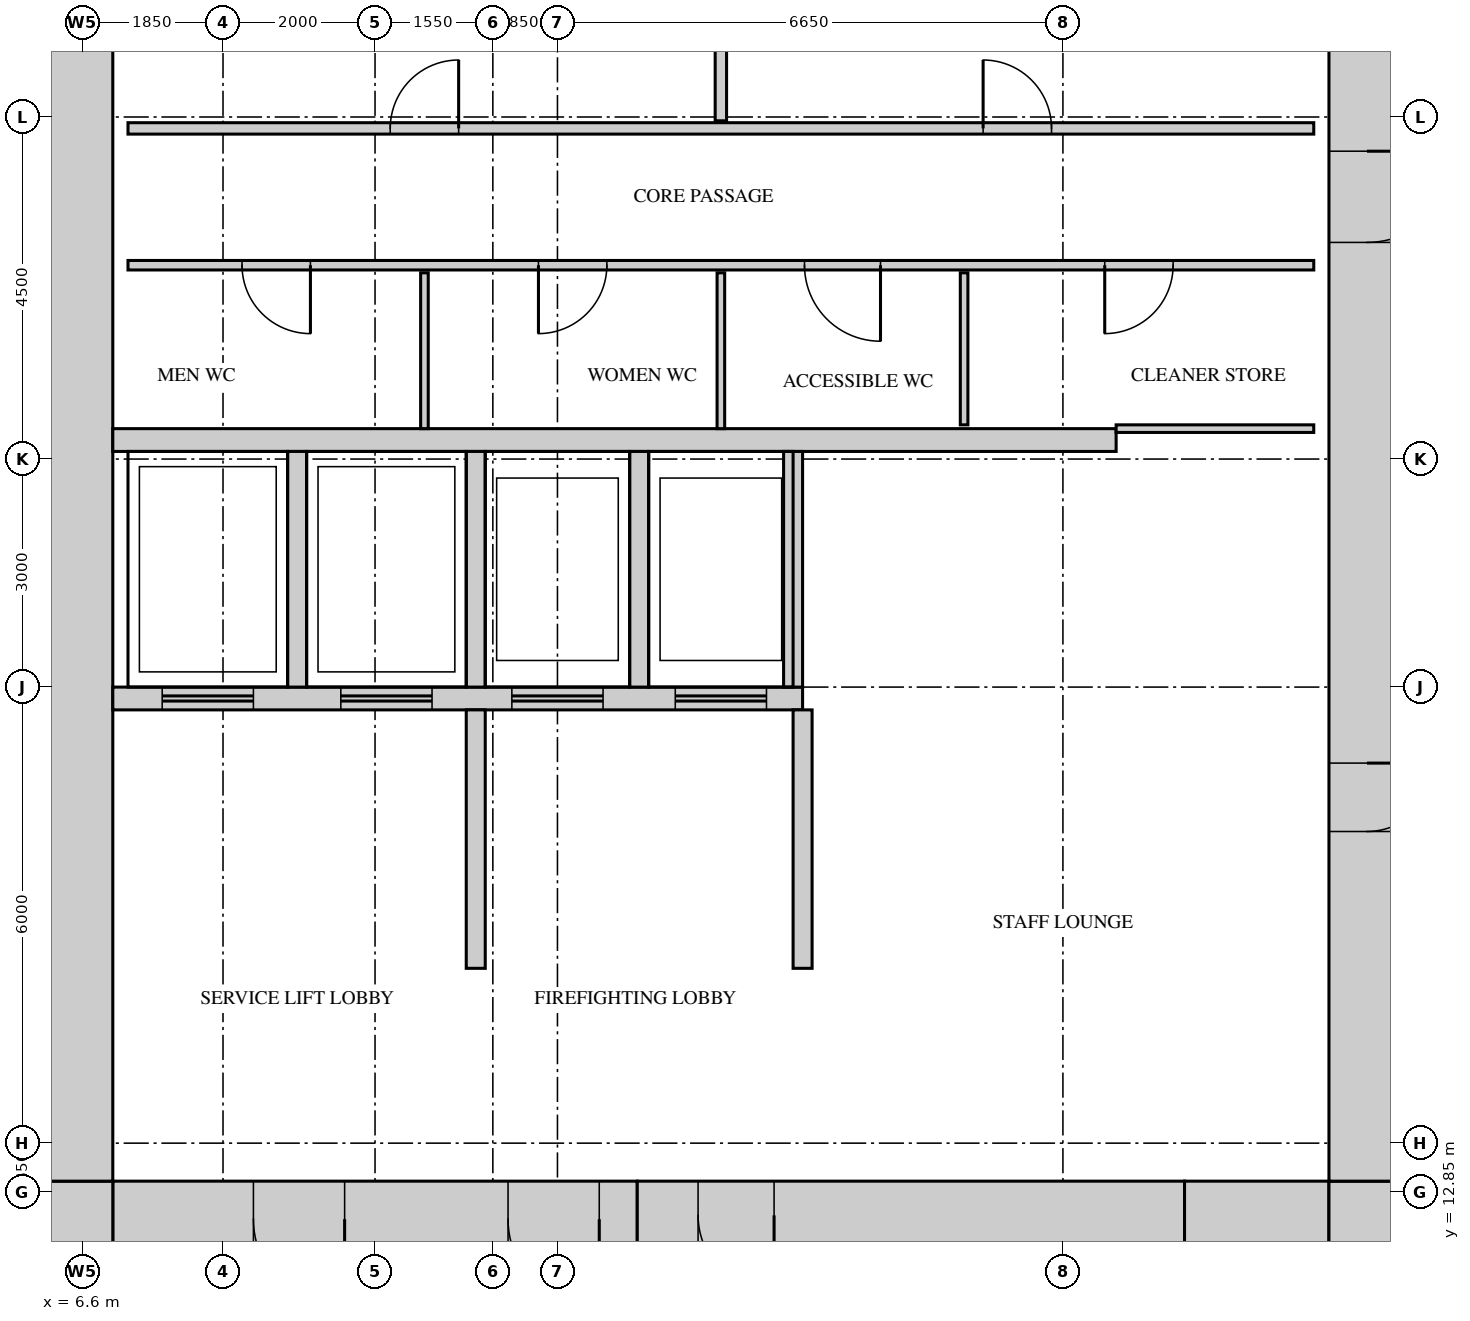
"""IFC4 building model, lengths in metres.
Left out: names, types, materials, properties, quantities, classifications, styles, units other than length and angle.
Written with IfcOpenShell. Run it as: python <this file> out.ifc"""

import sys

from ifc_helpers import new_model, si_unit, direction, frame, frame_2d, origin, place, context, subcontext, project, spatial, rectangle, extrude, source, transform, mapped, element, fill, save


model = new_model("IFC4")
c1 = context("Model", 3, precision=1e-05, world=origin(), true_north=direction((0.0, 1.0)))
c2 = subcontext(c1, "Body", "Model", "MODEL_VIEW")
j1 = project(units=[si_unit("LENGTHUNIT", "METRE"), si_unit("PLANEANGLEUNIT", "RADIAN")], contexts=[c1])
p1 = place(None, origin())
s1 = spatial("IfcSite", under=j1, at=p1, CompositionType="ELEMENT")
p2 = place(p1, origin())
s2 = spatial("IfcBuilding", under=s1, at=p2, CompositionType="ELEMENT")
p3 = place(p2, frame((0.0, 0.0, 145.5)))
s3 = spatial("IfcBuildingStorey", under=s2, at=p3, CompositionType="ELEMENT", Elevation=145.5)
m1 = source(origin(), c2, "Body", "SweptSolid", [
    extrude(rectangle(XDim=6.9, YDim=1.0, at=frame_2d((3.45, 0.0))), origin(), (0.0, 0.0, 1.0), 4.1),
])
p4 = place(p3, frame((7.0, 12.5, 0.0), z_axis=(0.0, 0.0, 1.0), x_axis=(1.0, 0.0, 0.0)))
e1 = element("IfcWall", 1, at=p4, inside=s3, PredefinedType="SHEAR", context=c2, shape_type="MappedRepresentation", body=[
    mapped(m1, transform((0.0, 0.0, 0.0))),
])
m2 = source(origin(), c2, "Body", "SweptSolid", [
    extrude(rectangle(XDim=1.2, YDim=2.1, at=frame_2d((0.6, 1.05))), frame((0.0, 0.51, 0.0), z_axis=(0.0, -1.0, 0.0), x_axis=(1.0, 0.0, 0.0)), (0.0, 0.0, 1.0), 1.02),
])
p5 = place(p4, frame((5.2, 0.0, 0.0)))
e2 = element("IfcOpeningElement", 2, at=p5, cuts=e1, PredefinedType="OPENING", context=c2, shape_type="MappedRepresentation", body=[
    mapped(m2, transform((0.0, 0.0, 0.0))),
])
p6 = place(p4, frame((1.85, 0.0, 0.0)))
e3 = element("IfcOpeningElement", 3, at=p6, cuts=e1, PredefinedType="OPENING", context=c2, shape_type="MappedRepresentation", body=[
    mapped(m2, transform((0.0, 0.0, 0.0))),
])
m3 = source(origin(), c2, "Body", "SweptSolid", [
    extrude(rectangle(XDim=7.2, YDim=0.9, at=frame_2d((3.6, 0.0))), origin(), (0.0, 0.0, 1.0), 4.1),
])
p7 = place(p3, frame((13.9, 12.55, 0.0), z_axis=(0.0, 0.0, 1.0), x_axis=(1.0, 0.0, 0.0)))
e4 = element("IfcWall", 4, at=p7, inside=s3, PredefinedType="SHEAR", context=c2, shape_type="MappedRepresentation", body=[
    mapped(m3, transform((0.0, 0.0, 0.0))),
])
m4 = source(origin(), c2, "Body", "SweptSolid", [
    extrude(rectangle(XDim=1.0, YDim=2.1, at=frame_2d((0.5, 1.05))), frame((0.0, 0.46, 0.0), z_axis=(0.0, -1.0, 0.0), x_axis=(1.0, 0.0, 0.0)), (0.0, 0.0, 1.0), 0.92),
])
p8 = place(p7, frame((0.8, 0.0, 0.0)))
e5 = element("IfcOpeningElement", 5, at=p8, cuts=e4, PredefinedType="OPENING", context=c2, shape_type="MappedRepresentation", body=[
    mapped(m4, transform((0.0, 0.0, 0.0))),
])
m5 = source(origin(), c2, "Body", "SweptSolid", [
    extrude(rectangle(XDim=1.9, YDim=1.0, at=frame_2d((0.95, 0.0))), origin(), (0.0, 0.0, 1.0), 4.1),
])
p9 = place(p3, frame((21.1, 12.5, 0.0), z_axis=(0.0, 0.0, 1.0), x_axis=(1.0, 0.0, 0.0)))
e6 = element("IfcWall", 6, at=p9, inside=s3, PredefinedType="SHEAR", context=c2, shape_type="MappedRepresentation", body=[
    mapped(m5, transform((0.0, 0.0, 0.0))),
])
m6 = source(origin(), c2, "Body", "SweptSolid", [
    extrude(rectangle(XDim=1.0, YDim=1.0, at=frame_2d((0.5, 0.0))), origin(), (0.0, 0.0, 1.0), 4.1),
])
for number, where, z_axis, x_axis in (
    (7, (23.0, 12.5, 0.0), (0.0, 0.0, 1.0), (1.0, 0.0, 0.0)),
    (8, (6.0, 12.5, 0.0), (0.0, 0.0, 1.0), (1.0, 0.0, 0.0)),
):
    element("IfcWall", number, at=place(p3, frame(where, z_axis=z_axis, x_axis=x_axis)), inside=s3, PredefinedType="SHEAR", context=c2, shape_type="MappedRepresentation", body=[
        mapped(m6, transform((0.0, 0.0, 0.0))),
    ])
m7 = source(origin(), c2, "Body", "SweptSolid", [
    extrude(rectangle(XDim=28.0, YDim=1.0, at=frame_2d((14.0, 0.0))), origin(), (0.0, 0.0, 1.0), 4.1),
])
p10 = place(p3, frame((23.5, 13.0, 0.0), z_axis=(0.0, 0.0, 1.0), x_axis=(0.0, 1.0, 0.0)))
e9 = element("IfcWall", 9, at=p10, inside=s3, PredefinedType="SHEAR", context=c2, shape_type="MappedRepresentation", body=[
    mapped(m7, transform((0.0, 0.0, 0.0))),
])
m8 = source(origin(), c2, "Body", "SweptSolid", [
    extrude(rectangle(XDim=1.8, YDim=2.1, at=frame_2d((0.9, 1.05))), frame((0.0, 0.51, 0.0), z_axis=(0.0, -1.0, 0.0), x_axis=(1.0, 0.0, 0.0)), (0.0, 0.0, 1.0), 1.02),
])
p11 = place(p10, frame((22.6, 0.0, 0.0)))
e10 = element("IfcOpeningElement", 10, at=p11, cuts=e9, PredefinedType="OPENING", context=c2, shape_type="MappedRepresentation", body=[
    mapped(m8, transform((0.0, 0.0, 0.0))),
])
p12 = place(p10, frame((12.35, 0.0, 0.0)))
e11 = element("IfcOpeningElement", 11, at=p12, cuts=e9, PredefinedType="OPENING", context=c2, shape_type="MappedRepresentation", body=[
    mapped(m2, transform((0.0, 0.0, 0.0))),
])
m9 = source(origin(), c2, "Body", "SweptSolid", [
    extrude(rectangle(XDim=0.9, YDim=2.1, at=frame_2d((0.45, 1.05))), frame((0.0, 0.51, 0.0), z_axis=(0.0, -1.0, 0.0), x_axis=(1.0, 0.0, 0.0)), (0.0, 0.0, 1.0), 1.02),
])
p13 = place(p10, frame((4.6, 0.0, 0.0)))
e12 = element("IfcOpeningElement", 12, at=p13, cuts=e9, PredefinedType="OPENING", context=c2, shape_type="MappedRepresentation", body=[
    mapped(m9, transform((0.0, 0.0, 0.0))),
])
p14 = place(p3, frame((6.5, 13.0, 0.0), z_axis=(0.0, 0.0, 1.0), x_axis=(0.0, 1.0, 0.0)))
e13 = element("IfcWall", 13, at=p14, inside=s3, PredefinedType="SHEAR", context=c2, shape_type="MappedRepresentation", body=[
    mapped(m7, transform((0.0, 0.0, 0.0))),
])
m10 = source(origin(), c2, "Body", "SweptSolid", [
    extrude(rectangle(XDim=13.2, YDim=0.3, at=frame_2d((6.6, 0.0))), origin(), (0.0, 0.0, 1.0), 4.1),
])
p15 = place(p3, frame((7.0, 22.75, 0.0), z_axis=(0.0, 0.0, 1.0), x_axis=(1.0, 0.0, 0.0)))
e14 = element("IfcWall", 14, at=p15, inside=s3, PredefinedType="STANDARD", context=c2, shape_type="MappedRepresentation", body=[
    mapped(m10, transform((0.0, 0.0, 0.0))),
])
m11 = source(origin(), c2, "Body", "SweptSolid", [
    extrude(rectangle(XDim=9.075, YDim=0.3, at=frame_2d((4.538, 0.0))), origin(), (0.0, 0.0, 1.0), 4.1),
])
p16 = place(p3, frame((7.0, 19.35, 0.0), z_axis=(0.0, 0.0, 1.0), x_axis=(1.0, 0.0, 0.0)))
e15 = element("IfcWall", 15, at=p16, inside=s3, PredefinedType="STANDARD", context=c2, shape_type="MappedRepresentation", body=[
    mapped(m11, transform((0.0, 0.0, 0.0))),
])
m12 = source(origin(), c2, "Body", "SweptSolid", [
    extrude(rectangle(XDim=1.2, YDim=2.1, at=frame_2d((0.6, 1.05))), frame((0.0, 0.16, 0.0), z_axis=(0.0, -1.0, 0.0), x_axis=(1.0, 0.0, 0.0)), (0.0, 0.0, 1.0), 0.32),
])
p17 = place(p16, frame((0.65, 0.0, 0.0)))
e16 = element("IfcOpeningElement", 16, at=p17, cuts=e15, PredefinedType="OPENING", context=c2, shape_type="MappedRepresentation", body=[
    mapped(m12, transform((0.0, 0.0, 0.0))),
])
p18 = place(p16, frame((3.0, 0.0, 0.0)))
e17 = element("IfcOpeningElement", 17, at=p18, cuts=e15, PredefinedType="OPENING", context=c2, shape_type="MappedRepresentation", body=[
    mapped(m12, transform((0.0, 0.0, 0.0))),
])
p19 = place(p16, frame((5.25, 0.0, 0.0)))
e18 = element("IfcOpeningElement", 18, at=p19, cuts=e15, PredefinedType="OPENING", context=c2, shape_type="MappedRepresentation", body=[
    mapped(m12, transform((0.0, 0.0, 0.0))),
])
p20 = place(p16, frame((7.4, 0.0, 0.0)))
e19 = element("IfcOpeningElement", 19, at=p20, cuts=e15, PredefinedType="OPENING", context=c2, shape_type="MappedRepresentation", body=[
    mapped(m12, transform((0.0, 0.0, 0.0))),
])
m13 = source(origin(), c2, "Body", "SweptSolid", [
    extrude(rectangle(XDim=3.1, YDim=0.25, at=frame_2d((1.55, 0.0))), origin(), (0.0, 0.0, 1.0), 4.1),
])
for number, where, z_axis, x_axis in (
    (20, (9.425, 19.5, 0.0), (0.0, 0.0, 1.0), (0.0, 1.0, 0.0)),
    (21, (11.775, 19.5, 0.0), (0.0, 0.0, 1.0), (0.0, 1.0, 0.0)),
    (22, (13.925, 19.5, 0.0), (0.0, 0.0, 1.0), (0.0, 1.0, 0.0)),
    (23, (15.95, 19.5, 0.0), (0.0, 0.0, 1.0), (0.0, 1.0, 0.0)),
):
    element("IfcWall", number, at=place(p3, frame(where, z_axis=z_axis, x_axis=x_axis)), inside=s3, PredefinedType="STANDARD", context=c2, shape_type="MappedRepresentation", body=[
        mapped(m13, transform((0.0, 0.0, 0.0))),
    ])
m14 = source(origin(), c2, "Body", "SweptSolid", [
    extrude(rectangle(XDim=3.4, YDim=0.25, at=frame_2d((1.7, 0.0))), origin(), (0.0, 0.0, 1.0), 4.1),
])
for number, where, z_axis, x_axis in (
    (24, (16.075, 15.8, 0.0), (0.0, 0.0, 1.0), (0.0, 1.0, 0.0)),
    (25, (11.775, 15.8, 0.0), (0.0, 0.0, 1.0), (0.0, 1.0, 0.0)),
):
    element("IfcWall", number, at=place(p3, frame(where, z_axis=z_axis, x_axis=x_axis)), inside=s3, PredefinedType="STANDARD", context=c2, shape_type="MappedRepresentation", body=[
        mapped(m14, transform((0.0, 0.0, 0.0))),
    ])
m15 = source(origin(), c2, "Body", "SweptSolid", [
    extrude(rectangle(XDim=2.05, YDim=0.1, at=frame_2d((1.025, 0.0))), origin(), (0.0, 0.0, 1.0), 4.2),
])
for number, where, z_axis, x_axis in (
    (26, (11.1, 22.9, 0.0), (0.0, 0.0, 1.0), (0.0, 1.0, 0.0)),
    (27, (15.0, 22.9, 0.0), (0.0, 0.0, 1.0), (0.0, 1.0, 0.0)),
):
    element("IfcWall", number, at=place(p3, frame(where, z_axis=z_axis, x_axis=x_axis)), inside=s3, PredefinedType="PARTITIONING", context=c2, shape_type="MappedRepresentation", body=[
        mapped(m15, transform((0.0, 0.0, 0.0))),
    ])
m16 = source(origin(), c2, "Body", "SweptSolid", [
    extrude(rectangle(XDim=2.6, YDim=0.1, at=frame_2d((1.3, 0.0))), origin(), (0.0, 0.0, 1.0), 4.2),
])
p21 = place(p3, frame((20.2, 22.9, 0.0), z_axis=(0.0, 0.0, 1.0), x_axis=(1.0, 0.0, 0.0)))
e28 = element("IfcWall", 28, at=p21, inside=s3, PredefinedType="PARTITIONING", context=c2, shape_type="MappedRepresentation", body=[
    mapped(m16, transform((0.0, 0.0, 0.0))),
])
m17 = source(origin(), c2, "Body", "SweptSolid", [
    extrude(rectangle(XDim=2.0, YDim=0.1, at=frame_2d((1.0, 0.0))), origin(), (0.0, 0.0, 1.0), 4.2),
])
p22 = place(p3, frame((18.2, 22.95, 0.0), z_axis=(0.0, 0.0, 1.0), x_axis=(0.0, 1.0, 0.0)))
e29 = element("IfcWall", 29, at=p22, inside=s3, PredefinedType="PARTITIONING", context=c2, shape_type="MappedRepresentation", body=[
    mapped(m17, transform((0.0, 0.0, 0.0))),
])
m18 = source(origin(), c2, "Body", "SweptSolid", [
    extrude(rectangle(XDim=15.6, YDim=0.125, at=frame_2d((7.8, 0.0))), origin(), (0.0, 0.0, 1.0), 4.2),
])
p23 = place(p3, frame((7.2, 25.05, 0.0), z_axis=(0.0, 0.0, 1.0), x_axis=(1.0, 0.0, 0.0)))
e30 = element("IfcWall", 30, at=p23, inside=s3, PredefinedType="PARTITIONING", context=c2, shape_type="MappedRepresentation", body=[
    mapped(m18, transform((0.0, 0.0, 0.0))),
])
m19 = source(origin(), c2, "Body", "SweptSolid", [
    extrude(rectangle(XDim=0.9, YDim=2.1, at=frame_2d((0.45, 1.05))), frame((0.0, 0.073, 0.0), z_axis=(0.0, -1.0, 0.0), x_axis=(1.0, 0.0, 0.0)), (0.0, 0.0, 1.0), 0.145),
])
p24 = place(p23, frame((1.5, 0.0, 0.0)))
e31 = element("IfcOpeningElement", 31, at=p24, cuts=e30, PredefinedType="OPENING", context=c2, shape_type="MappedRepresentation", body=[
    mapped(m19, transform((0.0, 0.0, 0.0))),
])
p25 = place(p23, frame((5.4, 0.0, 0.0)))
e32 = element("IfcOpeningElement", 32, at=p25, cuts=e30, PredefinedType="OPENING", context=c2, shape_type="MappedRepresentation", body=[
    mapped(m19, transform((0.0, 0.0, 0.0))),
])
m20 = source(origin(), c2, "Body", "SweptSolid", [
    extrude(rectangle(XDim=1.0, YDim=2.1, at=frame_2d((0.5, 1.05))), frame((0.0, 0.073, 0.0), z_axis=(0.0, -1.0, 0.0), x_axis=(1.0, 0.0, 0.0)), (0.0, 0.0, 1.0), 0.145),
])
p26 = place(p23, frame((8.9, 0.0, 0.0)))
e33 = element("IfcOpeningElement", 33, at=p26, cuts=e30, PredefinedType="OPENING", context=c2, shape_type="MappedRepresentation", body=[
    mapped(m20, transform((0.0, 0.0, 0.0))),
])
p27 = place(p23, frame((12.85, 0.0, 0.0)))
e34 = element("IfcOpeningElement", 34, at=p27, cuts=e30, PredefinedType="OPENING", context=c2, shape_type="MappedRepresentation", body=[
    mapped(m19, transform((0.0, 0.0, 0.0))),
])
m21 = source(origin(), c2, "Body", "SweptSolid", [
    extrude(rectangle(XDim=15.6, YDim=0.15, at=frame_2d((7.8, 0.0))), origin(), (0.0, 0.0, 1.0), 4.2),
])
p28 = place(p3, frame((7.2, 26.85, 0.0), z_axis=(0.0, 0.0, 1.0), x_axis=(1.0, 0.0, 0.0)))
e35 = element("IfcWall", 35, at=p28, inside=s3, PredefinedType="PARTITIONING", context=c2, shape_type="MappedRepresentation", body=[
    mapped(m21, transform((0.0, 0.0, 0.0))),
])
m22 = source(origin(), c2, "Body", "SweptSolid", [
    extrude(rectangle(XDim=0.9, YDim=2.1, at=frame_2d((0.45, 1.05))), frame((0.0, 0.085, 0.0), z_axis=(0.0, -1.0, 0.0), x_axis=(1.0, 0.0, 0.0)), (0.0, 0.0, 1.0), 0.17),
])
p29 = place(p28, frame((3.45, 0.0, 0.0)))
e36 = element("IfcOpeningElement", 36, at=p29, cuts=e35, PredefinedType="OPENING", context=c2, shape_type="MappedRepresentation", body=[
    mapped(m22, transform((0.0, 0.0, 0.0))),
])
p30 = place(p28, frame((11.25, 0.0, 0.0)))
e37 = element("IfcOpeningElement", 37, at=p30, cuts=e35, PredefinedType="OPENING", context=c2, shape_type="MappedRepresentation", body=[
    mapped(m22, transform((0.0, 0.0, 0.0))),
])
m23 = source(origin(), c2, "Body", "SweptSolid", [
    extrude(rectangle(XDim=4.95, YDim=0.15, at=frame_2d((2.475, 0.0))), origin(), (0.0, 0.0, 1.0), 4.2),
])
p31 = place(p3, frame((15.0, 26.95, 0.0), z_axis=(0.0, 0.0, 1.0), x_axis=(0.0, 1.0, 0.0)))
e38 = element("IfcWall", 38, at=p31, inside=s3, PredefinedType="PARTITIONING", context=c2, shape_type="MappedRepresentation", body=[
    mapped(m23, transform((0.0, 0.0, 0.0))),
])
m24 = source(origin(), c2, "Body", "SweptSolid", [
    extrude(rectangle(XDim=1.2, YDim=2.1, at=frame_2d((0.6, 1.05))), frame((0.0, 0.45, 0.0), z_axis=(0.0, -1.0, 0.0), x_axis=(1.0, 0.0, 0.0)), (0.0, 0.0, 1.0), 0.9),
])
p32 = place(p12, origin())
e39 = element("IfcDoor", 39, at=p32, inside=s3, OperationType="SINGLE_SWING_RIGHT", PredefinedType="DOOR", context=c2, shape_type="MappedRepresentation", body=[
    mapped(m24, transform((0.0, 0.0, 0.0))),
])
fill(e11, e39)
m25 = source(origin(), c2, "Body", "SweptSolid", [
    extrude(rectangle(XDim=0.9, YDim=2.1, at=frame_2d((0.45, 1.05))), frame((0.0, 0.025, 0.0), z_axis=(0.0, -1.0, 0.0), x_axis=(1.0, 0.0, 0.0)), (0.0, 0.0, 1.0), 0.05),
])
p33 = place(p29, origin())
e40 = element("IfcDoor", 40, at=p33, inside=s3, OperationType="SINGLE_SWING_LEFT", PredefinedType="DOOR", context=c2, shape_type="MappedRepresentation", body=[
    mapped(m25, transform((0.0, 0.0, 0.0))),
])
fill(e36, e40)
p34 = place(p30, origin())
e41 = element("IfcDoor", 41, at=p34, inside=s3, OperationType="SINGLE_SWING_RIGHT", PredefinedType="DOOR", context=c2, shape_type="MappedRepresentation", body=[
    mapped(m25, transform((0.0, 0.0, 0.0))),
])
fill(e37, e41)
p35 = place(p24, origin())
e42 = element("IfcDoor", 42, at=p35, inside=s3, OperationType="SINGLE_SWING_RIGHT", PredefinedType="DOOR", context=c2, shape_type="MappedRepresentation", body=[
    mapped(m25, transform((0.0, 0.0, 0.0))),
])
fill(e31, e42)
p36 = place(p25, origin())
e43 = element("IfcDoor", 43, at=p36, inside=s3, OperationType="SINGLE_SWING_LEFT", PredefinedType="DOOR", context=c2, shape_type="MappedRepresentation", body=[
    mapped(m25, transform((0.0, 0.0, 0.0))),
])
fill(e32, e43)
m26 = source(origin(), c2, "Body", "SweptSolid", [
    extrude(rectangle(XDim=1.0, YDim=2.1, at=frame_2d((0.5, 1.05))), frame((0.0, 0.025, 0.0), z_axis=(0.0, -1.0, 0.0), x_axis=(1.0, 0.0, 0.0)), (0.0, 0.0, 1.0), 0.05),
])
p37 = place(p26, origin())
e44 = element("IfcDoor", 44, at=p37, inside=s3, OperationType="SINGLE_SWING_RIGHT", PredefinedType="DOOR", context=c2, shape_type="MappedRepresentation", body=[
    mapped(m26, transform((0.0, 0.0, 0.0))),
])
fill(e33, e44)
p38 = place(p27, origin())
e45 = element("IfcDoor", 45, at=p38, inside=s3, OperationType="SINGLE_SWING_LEFT", PredefinedType="DOOR", context=c2, shape_type="MappedRepresentation", body=[
    mapped(m25, transform((0.0, 0.0, 0.0))),
])
fill(e34, e45)
m27 = source(origin(), c2, "Body", "SweptSolid", [
    extrude(rectangle(XDim=0.9, YDim=2.1, at=frame_2d((0.45, 1.05))), frame((0.0, 0.45, 0.0), z_axis=(0.0, -1.0, 0.0), x_axis=(1.0, 0.0, 0.0)), (0.0, 0.0, 1.0), 0.9),
])
p39 = place(p13, origin())
e46 = element("IfcDoor", 46, at=p39, inside=s3, OperationType="SINGLE_SWING_RIGHT", PredefinedType="DOOR", context=c2, shape_type="MappedRepresentation", body=[
    mapped(m27, transform((0.0, 0.0, 0.0))),
])
fill(e12, e46)
p40 = place(p5, origin())
e47 = element("IfcDoor", 47, at=p40, inside=s3, OperationType="SINGLE_SWING_RIGHT", PredefinedType="DOOR", context=c2, shape_type="MappedRepresentation", body=[
    mapped(m24, transform((0.0, 0.0, 0.0))),
])
fill(e2, e47)
p41 = place(p6, origin())
e48 = element("IfcDoor", 48, at=p41, inside=s3, OperationType="SINGLE_SWING_RIGHT", PredefinedType="DOOR", context=c2, shape_type="MappedRepresentation", body=[
    mapped(m24, transform((0.0, 0.0, 0.0))),
])
fill(e3, e48)
m28 = source(origin(), c2, "Body", "SweptSolid", [
    extrude(rectangle(XDim=1.0, YDim=2.1, at=frame_2d((0.5, 1.05))), frame((0.0, 0.4, 0.0), z_axis=(0.0, -1.0, 0.0), x_axis=(1.0, 0.0, 0.0)), (0.0, 0.0, 1.0), 0.8),
])
p42 = place(p8, origin())
e49 = element("IfcDoor", 49, at=p42, inside=s3, OperationType="SINGLE_SWING_RIGHT", PredefinedType="DOOR", context=c2, shape_type="MappedRepresentation", body=[
    mapped(m28, transform((0.0, 0.0, 0.0))),
])
fill(e5, e49)
m29 = source(origin(), c2, "Body", "SweptSolid", [
    extrude(rectangle(XDim=1.2, YDim=2.1, at=frame_2d((0.6, 1.05))), frame((0.0, 0.025, 0.0), z_axis=(0.0, -1.0, 0.0), x_axis=(1.0, 0.0, 0.0)), (0.0, 0.0, 1.0), 0.05),
])
p43 = place(p17, origin())
e50 = element("IfcDoor", 50, at=p43, inside=s3, OperationType="DOUBLE_DOOR_SLIDING", PredefinedType="DOOR", context=c2, shape_type="MappedRepresentation", body=[
    mapped(m29, transform((0.0, 0.0, 0.0))),
])
fill(e16, e50)
p44 = place(p18, origin())
e51 = element("IfcDoor", 51, at=p44, inside=s3, OperationType="DOUBLE_DOOR_SLIDING", PredefinedType="DOOR", context=c2, shape_type="MappedRepresentation", body=[
    mapped(m29, transform((0.0, 0.0, 0.0))),
])
fill(e17, e51)
p45 = place(p19, origin())
e52 = element("IfcDoor", 52, at=p45, inside=s3, OperationType="DOUBLE_DOOR_SLIDING", PredefinedType="DOOR", context=c2, shape_type="MappedRepresentation", body=[
    mapped(m29, transform((0.0, 0.0, 0.0))),
])
fill(e18, e52)
p46 = place(p20, origin())
e53 = element("IfcDoor", 53, at=p46, inside=s3, OperationType="DOUBLE_DOOR_SLIDING", PredefinedType="DOOR", context=c2, shape_type="MappedRepresentation", body=[
    mapped(m29, transform((0.0, 0.0, 0.0))),
])
fill(e19, e53)
save(model, sys.argv[1])
